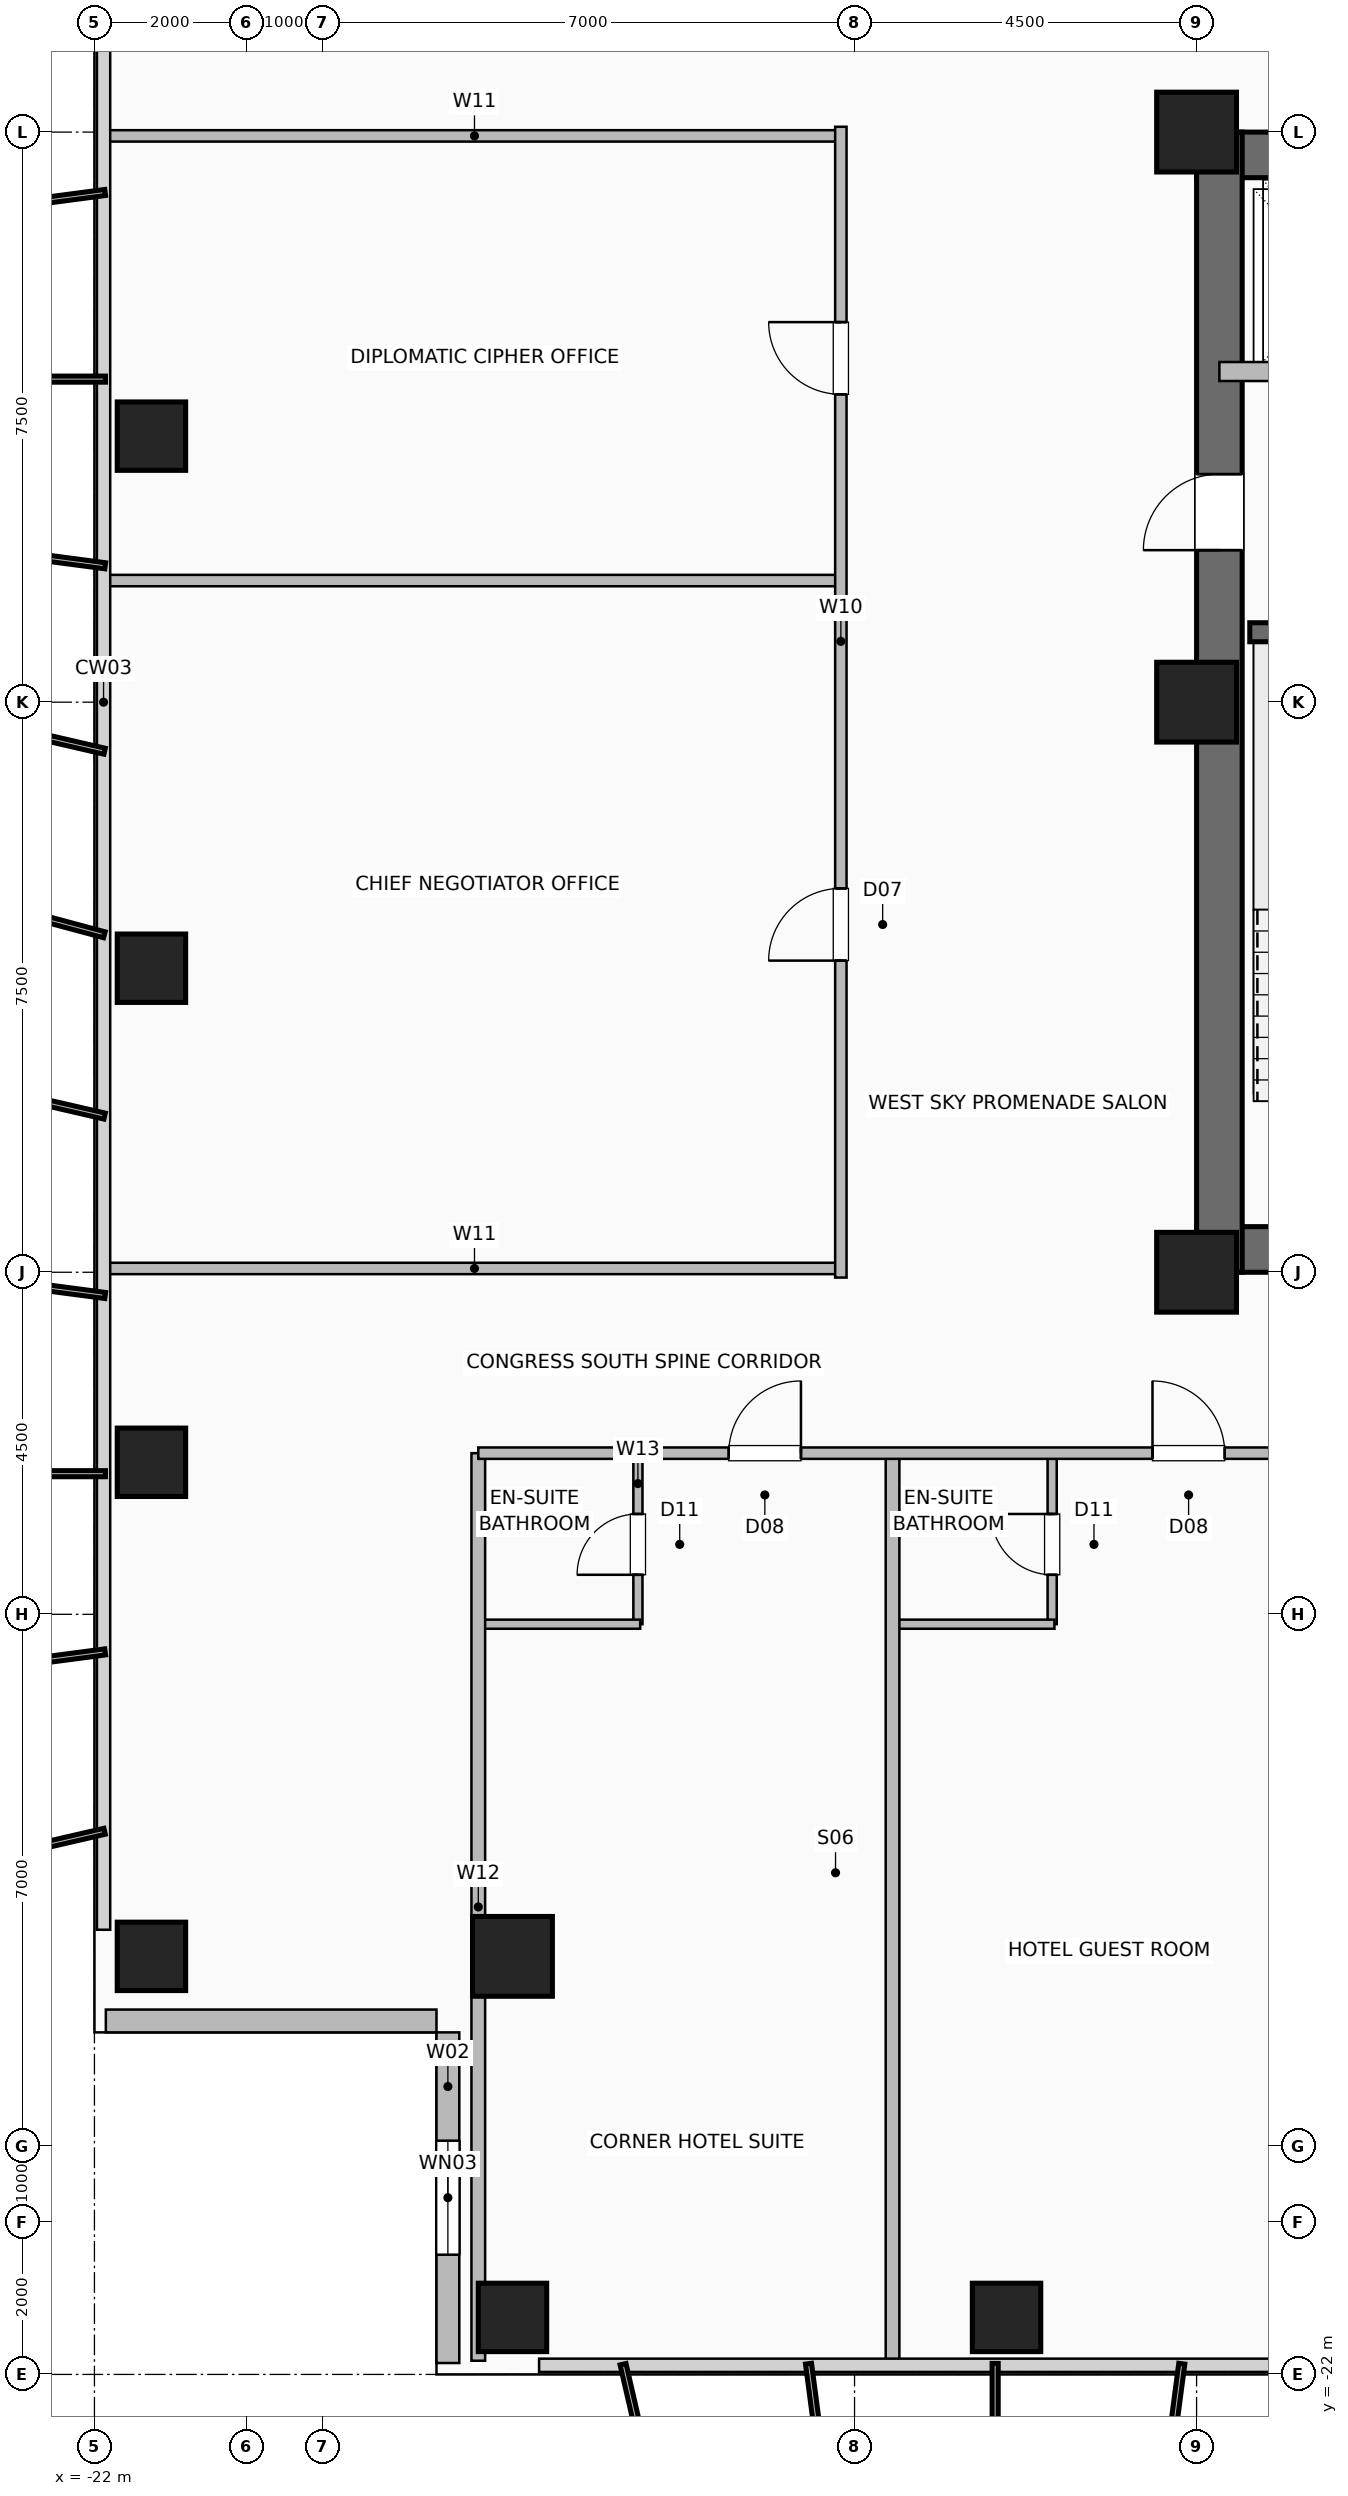
"""IFC4 building model, lengths in metres.
Left out: names, types, materials, properties, quantities, classifications, styles, units other than length and angle.
Written with IfcOpenShell. Run it as: python <this file> out.ifc"""

import sys

from ifc_helpers import new_model, si_unit, direction, frame, frame_2d, origin, origin_2d, place, context, subcontext, project, spatial, rectangle, hollow_rectangle, extrude, element, fill, save


model = new_model("IFC4")
c1 = context("Model", 3, precision=1e-05, world=origin(), true_north=direction((0.0, 1.0)))
c2 = subcontext(c1, "Body", "Model", "MODEL_VIEW")
j1 = project(units=[si_unit("LENGTHUNIT", "METRE"), si_unit("PLANEANGLEUNIT", "RADIAN")], contexts=[c1])
p1 = place(None, origin())
s1 = spatial("IfcSite", under=j1, at=p1, CompositionType="ELEMENT")
p2 = place(p1, origin())
s2 = spatial("IfcBuilding", under=s1, at=p2, CompositionType="ELEMENT")
p3 = place(p2, frame((0.0, 0.0, 148.0)))
s3 = spatial("IfcBuildingStorey", under=s2, at=p3, CompositionType="ELEMENT", Elevation=148.0)
for number, where, z_axis, x_axis in (
    (1, (-7.5, -7.5, 0.0), (0.0, 0.0, 1.0), (1.0, 0.0, 0.0)),
    (2, (-7.5, 7.5, 0.0), (0.0, 0.0, 1.0), (1.0, 0.0, 0.0)),
    (3, (-7.5, 0.0, 0.0), (0.0, 0.0, 1.0), (1.0, 0.0, 0.0)),
):
    element("IfcColumn", number, at=place(p3, frame(where, z_axis=z_axis, x_axis=x_axis)), inside=s3, PredefinedType="COLUMN", context=c2, shape_type="SweptSolid", body=[
        extrude(hollow_rectangle(XDim=1.05, YDim=1.05, WallThickness=0.05, at=origin_2d()), origin(), (0.0, 0.0, 1.0), 3.6),
    ])
for number, where, z_axis, x_axis in (
    (4, (-16.5, -21.25, 0.0), (0.0, 0.0, 1.0), (1.0, 0.0, 0.0)),
    (5, (-21.25, -16.5, 0.0), (0.0, 0.0, 1.0), (1.0, 0.0, 0.0)),
    (6, (-10.0, -21.25, 0.0), (0.0, 0.0, 1.0), (1.0, 0.0, 0.0)),
    (7, (-21.25, -10.0, 0.0), (0.0, 0.0, 1.0), (1.0, 0.0, 0.0)),
    (8, (-21.25, -3.5, 0.0), (0.0, 0.0, 1.0), (1.0, 0.0, 0.0)),
    (9, (-21.25, 3.5, 0.0), (0.0, 0.0, 1.0), (1.0, 0.0, 0.0)),
):
    element("IfcColumn", number, at=place(p3, frame(where, z_axis=z_axis, x_axis=x_axis)), inside=s3, PredefinedType="COLUMN", context=c2, shape_type="SweptSolid", body=[
        extrude(hollow_rectangle(XDim=0.9, YDim=0.9, WallThickness=0.045, at=origin_2d()), origin(), (0.0, 0.0, 1.0), 3.6),
    ])
p4 = place(p3, frame((-16.5, -16.5, 0.0), z_axis=(0.0, 0.0, 1.0), x_axis=(1.0, 0.0, 0.0)))
e10 = element("IfcColumn", 10, at=p4, inside=s3, PredefinedType="COLUMN", context=c2, shape_type="SweptSolid", body=[
    extrude(hollow_rectangle(XDim=1.05, YDim=1.05, WallThickness=0.05, at=origin_2d()), origin(), (0.0, 0.0, 1.0), 3.6),
])
p5 = place(p3, frame((-17.35, -21.85, 0.0), z_axis=(0.0, 0.0, 1.0), x_axis=(0.0, 1.0, 0.0)))
e11 = element("IfcWall", 11, at=p5, inside=s3, PredefinedType="SOLIDWALL", context=c2, shape_type="SweptSolid", body=[
    extrude(rectangle(XDim=4.35, YDim=0.3, at=frame_2d((2.175, 0.0))), origin(), (0.0, 0.0, 1.0), 3.36),
])
p6 = place(p5, frame((1.425, 0.0, 0.9)))
e12 = element("IfcOpeningElement", 12, at=p6, cuts=e11, PredefinedType="OPENING", context=c2, shape_type="SweptSolid", body=[
    extrude(rectangle(XDim=1.5, YDim=1.8, at=frame_2d((0.75, 0.9))), frame((0.0, 0.16, 0.0), z_axis=(0.0, -1.0, 0.0), x_axis=(1.0, 0.0, 0.0)), (0.0, 0.0, 1.0), 0.32),
])
p7 = place(p3, frame((-21.85, -17.35, 0.0), z_axis=(0.0, 0.0, 1.0), x_axis=(1.0, 0.0, 0.0)))
e13 = element("IfcWall", 13, at=p7, inside=s3, PredefinedType="SOLIDWALL", context=c2, shape_type="SweptSolid", body=[
    extrude(rectangle(XDim=4.35, YDim=0.3, at=frame_2d((2.175, 0.0))), origin(), (0.0, 0.0, 1.0), 3.36),
])
p8 = place(p3, frame((-7.5, -7.2, 0.0), z_axis=(0.0, 0.0, 1.0), x_axis=(1.0, 0.0, 0.0)))
e14 = element("IfcWall", 14, at=p8, inside=s3, PredefinedType="SHEAR", context=c2, shape_type="SweptSolid", body=[
    extrude(rectangle(XDim=15.0, YDim=0.6, at=frame_2d((7.5, 0.0))), origin(), (0.0, 0.0, 1.0), 3.36),
])
p9 = place(p8, frame((1.55, 0.0, 0.0)))
e15 = element("IfcOpeningElement", 15, at=p9, cuts=e14, PredefinedType="OPENING", context=c2, shape_type="SweptSolid", body=[
    extrude(rectangle(XDim=1.05, YDim=2.08, at=frame_2d((0.525, 1.04))), frame((0.0, 0.31, 0.0), z_axis=(0.0, -1.0, 0.0), x_axis=(1.0, 0.0, 0.0)), (0.0, 0.0, 1.0), 0.62),
])
p10 = place(p8, frame((12.4, 0.0, 0.0)))
e16 = element("IfcOpeningElement", 16, at=p10, cuts=e14, PredefinedType="OPENING", context=c2, shape_type="SweptSolid", body=[
    extrude(rectangle(XDim=1.05, YDim=2.08, at=frame_2d((0.525, 1.04))), frame((0.0, 0.31, 0.0), z_axis=(0.0, -1.0, 0.0), x_axis=(1.0, 0.0, 0.0)), (0.0, 0.0, 1.0), 0.62),
])
p11 = place(p8, frame((5.2, 0.0, 0.0)))
e17 = element("IfcOpeningElement", 17, at=p11, cuts=e14, PredefinedType="OPENING", context=c2, shape_type="SweptSolid", body=[
    extrude(rectangle(XDim=1.0, YDim=2.08, at=frame_2d((0.5, 1.04))), frame((0.0, 0.31, 0.0), z_axis=(0.0, -1.0, 0.0), x_axis=(1.0, 0.0, 0.0)), (0.0, 0.0, 1.0), 0.62),
])
p12 = place(p8, frame((8.65, 0.0, 0.0)))
e18 = element("IfcOpeningElement", 18, at=p12, cuts=e14, PredefinedType="OPENING", context=c2, shape_type="SweptSolid", body=[
    extrude(rectangle(XDim=1.0, YDim=2.08, at=frame_2d((0.5, 1.04))), frame((0.0, 0.31, 0.0), z_axis=(0.0, -1.0, 0.0), x_axis=(1.0, 0.0, 0.0)), (0.0, 0.0, 1.0), 0.62),
])
p13 = place(p3, frame((-7.5, 7.2, 0.0), z_axis=(0.0, 0.0, 1.0), x_axis=(1.0, 0.0, 0.0)))
e19 = element("IfcWall", 19, at=p13, inside=s3, PredefinedType="SHEAR", context=c2, shape_type="SweptSolid", body=[
    extrude(rectangle(XDim=15.0, YDim=0.6, at=frame_2d((7.5, 0.0))), origin(), (0.0, 0.0, 1.0), 3.36),
])
p14 = place(p3, frame((-7.2, -7.5, 0.0), z_axis=(0.0, 0.0, 1.0), x_axis=(0.0, 1.0, 0.0)))
e20 = element("IfcWall", 20, at=p14, inside=s3, PredefinedType="SHEAR", context=c2, shape_type="SweptSolid", body=[
    extrude(rectangle(XDim=15.0, YDim=0.6, at=frame_2d((7.5, 0.0))), origin(), (0.0, 0.0, 1.0), 3.36),
])
p15 = place(p14, frame((9.5, 0.0, 0.0)))
e21 = element("IfcOpeningElement", 21, at=p15, cuts=e20, PredefinedType="OPENING", context=c2, shape_type="SweptSolid", body=[
    extrude(rectangle(XDim=1.0, YDim=2.08, at=frame_2d((0.5, 1.04))), frame((0.0, 0.31, 0.0), z_axis=(0.0, -1.0, 0.0), x_axis=(1.0, 0.0, 0.0)), (0.0, 0.0, 1.0), 0.62),
])
p16 = place(p3, frame((-6.8, 0.92, 0.0), z_axis=(0.0, 0.0, 1.0), x_axis=(1.0, 0.0, 0.0)))
e22 = element("IfcWall", 22, at=p16, inside=s3, PredefinedType="SHEAR", context=c2, shape_type="SweptSolid", body=[
    extrude(rectangle(XDim=3.33, YDim=0.25, at=frame_2d((1.665, 0.0))), origin(), (0.0, 0.0, 1.0), 3.36),
])
p17 = place(p3, frame((-7.2, 4.35, 0.0), z_axis=(0.0, 0.0, 1.0), x_axis=(1.0, 0.0, 0.0)))
e23 = element("IfcWall", 23, at=p17, inside=s3, PredefinedType="SHEAR", context=c2, shape_type="SweptSolid", body=[
    extrude(rectangle(XDim=2.7, YDim=0.25, at=frame_2d((1.35, 0.0))), origin(), (0.0, 0.0, 1.0), 3.36),
])
p18 = place(p17, frame((0.75, 0.0, 0.0)))
e24 = element("IfcOpeningElement", 24, at=p18, cuts=e23, PredefinedType="OPENING", context=c2, shape_type="SweptSolid", body=[
    extrude(rectangle(XDim=1.2, YDim=2.2, at=frame_2d((0.6, 1.1))), frame((0.0, 0.135, 0.0), z_axis=(0.0, -1.0, 0.0), x_axis=(1.0, 0.0, 0.0)), (0.0, 0.0, 1.0), 0.27),
])
p19 = place(p3, frame((-14.85, -12.13, 0.0), z_axis=(0.0, 0.0, 1.0), x_axis=(0.0, 1.0, 0.0)))
e25 = element("IfcWall", 25, at=p19, inside=s3, PredefinedType="PLUMBINGWALL", context=c2, shape_type="SweptSolid", body=[
    extrude(rectangle(XDim=2.25, YDim=0.12, at=frame_2d((1.125, 0.0))), origin(), (0.0, 0.0, 1.0), 3.36),
])
p20 = place(p19, frame((0.65, 0.0, 0.0)))
e26 = element("IfcOpeningElement", 26, at=p20, cuts=e25, PredefinedType="OPENING", context=c2, shape_type="SweptSolid", body=[
    extrude(rectangle(XDim=0.8, YDim=2.05, at=frame_2d((0.4, 1.025))), frame((0.0, 0.07, 0.0), z_axis=(0.0, -1.0, 0.0), x_axis=(1.0, 0.0, 0.0)), (0.0, 0.0, 1.0), 0.14),
])
p21 = place(p3, frame((-16.92, -12.13, 0.0), z_axis=(0.0, 0.0, 1.0), x_axis=(1.0, 0.0, 0.0)))
e27 = element("IfcWall", 27, at=p21, inside=s3, PredefinedType="PLUMBINGWALL", context=c2, shape_type="SweptSolid", body=[
    extrude(rectangle(XDim=2.1, YDim=0.12, at=frame_2d((1.05, 0.0))), origin(), (0.0, 0.0, 1.0), 3.36),
])
p22 = place(p3, frame((-9.4, -12.13, 0.0), z_axis=(0.0, 0.0, 1.0), x_axis=(0.0, 1.0, 0.0)))
e28 = element("IfcWall", 28, at=p22, inside=s3, PredefinedType="PLUMBINGWALL", context=c2, shape_type="SweptSolid", body=[
    extrude(rectangle(XDim=2.25, YDim=0.12, at=frame_2d((1.125, 0.0))), origin(), (0.0, 0.0, 1.0), 3.36),
])
p23 = place(p22, frame((0.65, 0.0, 0.0)))
e29 = element("IfcOpeningElement", 29, at=p23, cuts=e28, PredefinedType="OPENING", context=c2, shape_type="SweptSolid", body=[
    extrude(rectangle(XDim=0.8, YDim=2.05, at=frame_2d((0.4, 1.025))), frame((0.0, 0.07, 0.0), z_axis=(0.0, -1.0, 0.0), x_axis=(1.0, 0.0, 0.0)), (0.0, 0.0, 1.0), 0.14),
])
p24 = place(p3, frame((-11.47, -12.13, 0.0), z_axis=(0.0, 0.0, 1.0), x_axis=(1.0, 0.0, 0.0)))
e30 = element("IfcWall", 30, at=p24, inside=s3, PredefinedType="PLUMBINGWALL", context=c2, shape_type="SweptSolid", body=[
    extrude(rectangle(XDim=2.1, YDim=0.12, at=frame_2d((1.05, 0.0))), origin(), (0.0, 0.0, 1.0), 3.36),
])
for number, where, z_axis, x_axis in (
    (31, (-16.95, -21.82, 0.0), (0.0, 0.0, 1.0), (0.0, 1.0, 0.0)),
    (32, (-11.5, -21.82, 0.0), (0.0, 0.0, 1.0), (0.0, 1.0, 0.0)),
):
    element("IfcWall", number, at=place(p3, frame(where, z_axis=z_axis, x_axis=x_axis)), inside=s3, PredefinedType="PARTITIONING", context=c2, shape_type="SweptSolid", body=[
        extrude(rectangle(XDim=11.94, YDim=0.18, at=frame_2d((5.97, 0.0))), origin(), (0.0, 0.0, 1.0), 3.36),
    ])
p25 = place(p3, frame((-16.95, -9.88, 0.0), z_axis=(0.0, 0.0, 1.0), x_axis=(1.0, 0.0, 0.0)))
e33 = element("IfcWall", 33, at=p25, inside=s3, PredefinedType="PARTITIONING", context=c2, shape_type="SweptSolid", body=[
    extrude(rectangle(XDim=33.9, YDim=0.15, at=frame_2d((16.95, 0.0))), origin(), (0.0, 0.0, 1.0), 3.36),
])
p26 = place(p25, frame((3.295, 0.0, 0.0)))
e34 = element("IfcOpeningElement", 34, at=p26, cuts=e33, PredefinedType="OPENING", context=c2, shape_type="SweptSolid", body=[
    extrude(rectangle(XDim=0.95, YDim=2.08, at=frame_2d((0.475, 1.04))), frame((0.0, 0.085, 0.0), z_axis=(0.0, -1.0, 0.0), x_axis=(1.0, 0.0, 0.0)), (0.0, 0.0, 1.0), 0.17),
])
p27 = place(p25, frame((8.87, 0.0, 0.0)))
e35 = element("IfcOpeningElement", 35, at=p27, cuts=e33, PredefinedType="OPENING", context=c2, shape_type="SweptSolid", body=[
    extrude(rectangle(XDim=0.95, YDim=2.08, at=frame_2d((0.475, 1.04))), frame((0.0, 0.085, 0.0), z_axis=(0.0, -1.0, 0.0), x_axis=(1.0, 0.0, 0.0)), (0.0, 0.0, 1.0), 0.17),
])
p28 = place(p25, frame((13.613, 0.0, 0.0)))
e36 = element("IfcOpeningElement", 36, at=p28, cuts=e33, PredefinedType="OPENING", context=c2, shape_type="SweptSolid", body=[
    extrude(rectangle(XDim=0.95, YDim=2.08, at=frame_2d((0.475, 1.04))), frame((0.0, 0.085, 0.0), z_axis=(0.0, -1.0, 0.0), x_axis=(1.0, 0.0, 0.0)), (0.0, 0.0, 1.0), 0.17),
])
p29 = place(p25, frame((17.468, 0.0, 0.0)))
e37 = element("IfcOpeningElement", 37, at=p29, cuts=e33, PredefinedType="OPENING", context=c2, shape_type="SweptSolid", body=[
    extrude(rectangle(XDim=0.95, YDim=2.08, at=frame_2d((0.475, 1.04))), frame((0.0, 0.085, 0.0), z_axis=(0.0, -1.0, 0.0), x_axis=(1.0, 0.0, 0.0)), (0.0, 0.0, 1.0), 0.17),
])
p30 = place(p25, frame((21.167, 0.0, 0.0)))
e38 = element("IfcOpeningElement", 38, at=p30, cuts=e33, PredefinedType="OPENING", context=c2, shape_type="SweptSolid", body=[
    extrude(rectangle(XDim=0.95, YDim=2.08, at=frame_2d((0.475, 1.04))), frame((0.0, 0.085, 0.0), z_axis=(0.0, -1.0, 0.0), x_axis=(1.0, 0.0, 0.0)), (0.0, 0.0, 1.0), 0.17),
])
p31 = place(p25, frame((26.17, 0.0, 0.0)))
e39 = element("IfcOpeningElement", 39, at=p31, cuts=e33, PredefinedType="OPENING", context=c2, shape_type="SweptSolid", body=[
    extrude(rectangle(XDim=0.95, YDim=2.08, at=frame_2d((0.475, 1.04))), frame((0.0, 0.085, 0.0), z_axis=(0.0, -1.0, 0.0), x_axis=(1.0, 0.0, 0.0)), (0.0, 0.0, 1.0), 0.17),
])
p32 = place(p25, frame((31.745, 0.0, 0.0)))
e40 = element("IfcOpeningElement", 40, at=p32, cuts=e33, PredefinedType="OPENING", context=c2, shape_type="SweptSolid", body=[
    extrude(rectangle(XDim=0.95, YDim=2.08, at=frame_2d((0.475, 1.04))), frame((0.0, 0.085, 0.0), z_axis=(0.0, -1.0, 0.0), x_axis=(1.0, 0.0, 0.0)), (0.0, 0.0, 1.0), 0.17),
])
for number, where, z_axis, x_axis in (
    (41, (-21.82, -7.45, 0.0), (0.0, 0.0, 1.0), (1.0, 0.0, 0.0)),
    (42, (-21.82, 1.6, 0.0), (0.0, 0.0, 1.0), (1.0, 0.0, 0.0)),
    (43, (-21.82, 7.45, 0.0), (0.0, 0.0, 1.0), (1.0, 0.0, 0.0)),
):
    element("IfcWall", number, at=place(p3, frame(where, z_axis=z_axis, x_axis=x_axis)), inside=s3, PredefinedType="PARTITIONING", context=c2, shape_type="SweptSolid", body=[
        extrude(rectangle(XDim=9.64, YDim=0.15, at=frame_2d((4.82, 0.0))), origin(), (0.0, 0.0, 1.0), 3.36),
    ])
p33 = place(p3, frame((-12.18, -7.57, 0.0), z_axis=(0.0, 0.0, 1.0), x_axis=(0.0, 1.0, 0.0)))
e44 = element("IfcWall", 44, at=p33, inside=s3, PredefinedType="PARTITIONING", context=c2, shape_type="SweptSolid", body=[
    extrude(rectangle(XDim=15.14, YDim=0.15, at=frame_2d((7.57, 0.0))), origin(), (0.0, 0.0, 1.0), 3.36),
])
p34 = place(p33, frame((4.17, 0.0, 0.0)))
e45 = element("IfcOpeningElement", 45, at=p34, cuts=e44, PredefinedType="OPENING", context=c2, shape_type="SweptSolid", body=[
    extrude(rectangle(XDim=0.95, YDim=2.06, at=frame_2d((0.475, 1.03))), frame((0.0, 0.085, 0.0), z_axis=(0.0, -1.0, 0.0), x_axis=(1.0, 0.0, 0.0)), (0.0, 0.0, 1.0), 0.17),
])
p35 = place(p33, frame((11.62, 0.0, 0.0)))
e46 = element("IfcOpeningElement", 46, at=p35, cuts=e44, PredefinedType="OPENING", context=c2, shape_type="SweptSolid", body=[
    extrude(rectangle(XDim=0.95, YDim=2.06, at=frame_2d((0.475, 1.03))), frame((0.0, 0.085, 0.0), z_axis=(0.0, -1.0, 0.0), x_axis=(1.0, 0.0, 0.0)), (0.0, 0.0, 1.0), 0.17),
])
p36 = place(p6, origin())
e47 = element("IfcWindow", 47, at=p36, inside=s3, PartitioningType="SINGLE_PANEL", PredefinedType="WINDOW", context=c2, shape_type="SweptSolid", body=[
    extrude(rectangle(XDim=1.5, YDim=1.8, at=frame_2d((0.75, 0.9))), frame((0.0, 0.03, 0.0), z_axis=(0.0, -1.0, 0.0), x_axis=(1.0, 0.0, 0.0)), (0.0, 0.0, 1.0), 0.06),
])
fill(e12, e47)
p37 = place(p15, origin())
e48 = element("IfcDoor", 48, at=p37, inside=s3, OperationType="SINGLE_SWING_LEFT", PredefinedType="DOOR", context=c2, shape_type="SweptSolid", body=[
    extrude(rectangle(XDim=1.0, YDim=2.08, at=frame_2d((0.5, 1.04))), frame((0.0, 0.025, 0.0), z_axis=(0.0, -1.0, 0.0), x_axis=(1.0, 0.0, 0.0)), (0.0, 0.0, 1.0), 0.05),
])
fill(e21, e48)
p38 = place(p20, origin())
e49 = element("IfcDoor", 49, at=p38, inside=s3, OperationType="SINGLE_SWING_LEFT", PredefinedType="DOOR", context=c2, shape_type="SweptSolid", body=[
    extrude(rectangle(XDim=0.8, YDim=2.05, at=frame_2d((0.4, 1.025))), frame((0.0, 0.025, 0.0), z_axis=(0.0, -1.0, 0.0), x_axis=(1.0, 0.0, 0.0)), (0.0, 0.0, 1.0), 0.05),
])
fill(e26, e49)
p39 = place(p23, origin())
e50 = element("IfcDoor", 50, at=p39, inside=s3, OperationType="SINGLE_SWING_RIGHT", PredefinedType="DOOR", context=c2, shape_type="SweptSolid", body=[
    extrude(rectangle(XDim=0.8, YDim=2.05, at=frame_2d((0.4, 1.025))), frame((0.0, 0.025, 0.0), z_axis=(0.0, -1.0, 0.0), x_axis=(1.0, 0.0, 0.0)), (0.0, 0.0, 1.0), 0.05),
])
fill(e29, e50)
p40 = place(p26, origin())
e51 = element("IfcDoor", 51, at=p40, inside=s3, OperationType="SINGLE_SWING_RIGHT", PredefinedType="DOOR", context=c2, shape_type="SweptSolid", body=[
    extrude(rectangle(XDim=0.95, YDim=2.08, at=frame_2d((0.475, 1.04))), frame((0.0, 0.025, 0.0), z_axis=(0.0, -1.0, 0.0), x_axis=(1.0, 0.0, 0.0)), (0.0, 0.0, 1.0), 0.05),
])
fill(e34, e51)
p41 = place(p27, origin())
e52 = element("IfcDoor", 52, at=p41, inside=s3, OperationType="SINGLE_SWING_LEFT", PredefinedType="DOOR", context=c2, shape_type="SweptSolid", body=[
    extrude(rectangle(XDim=0.95, YDim=2.08, at=frame_2d((0.475, 1.04))), frame((0.0, 0.025, 0.0), z_axis=(0.0, -1.0, 0.0), x_axis=(1.0, 0.0, 0.0)), (0.0, 0.0, 1.0), 0.05),
])
fill(e35, e52)
p42 = place(p34, origin())
e53 = element("IfcDoor", 53, at=p42, inside=s3, OperationType="SINGLE_SWING_LEFT", PredefinedType="DOOR", context=c2, shape_type="SweptSolid", body=[
    extrude(rectangle(XDim=0.95, YDim=2.06, at=frame_2d((0.475, 1.03))), frame((0.0, 0.025, 0.0), z_axis=(0.0, -1.0, 0.0), x_axis=(1.0, 0.0, 0.0)), (0.0, 0.0, 1.0), 0.05),
])
fill(e45, e53)
p43 = place(p35, origin())
e54 = element("IfcDoor", 54, at=p43, inside=s3, OperationType="SINGLE_SWING_RIGHT", PredefinedType="DOOR", context=c2, shape_type="SweptSolid", body=[
    extrude(rectangle(XDim=0.95, YDim=2.06, at=frame_2d((0.475, 1.03))), frame((0.0, 0.025, 0.0), z_axis=(0.0, -1.0, 0.0), x_axis=(1.0, 0.0, 0.0)), (0.0, 0.0, 1.0), 0.05),
])
fill(e46, e54)
save(model, sys.argv[1])
